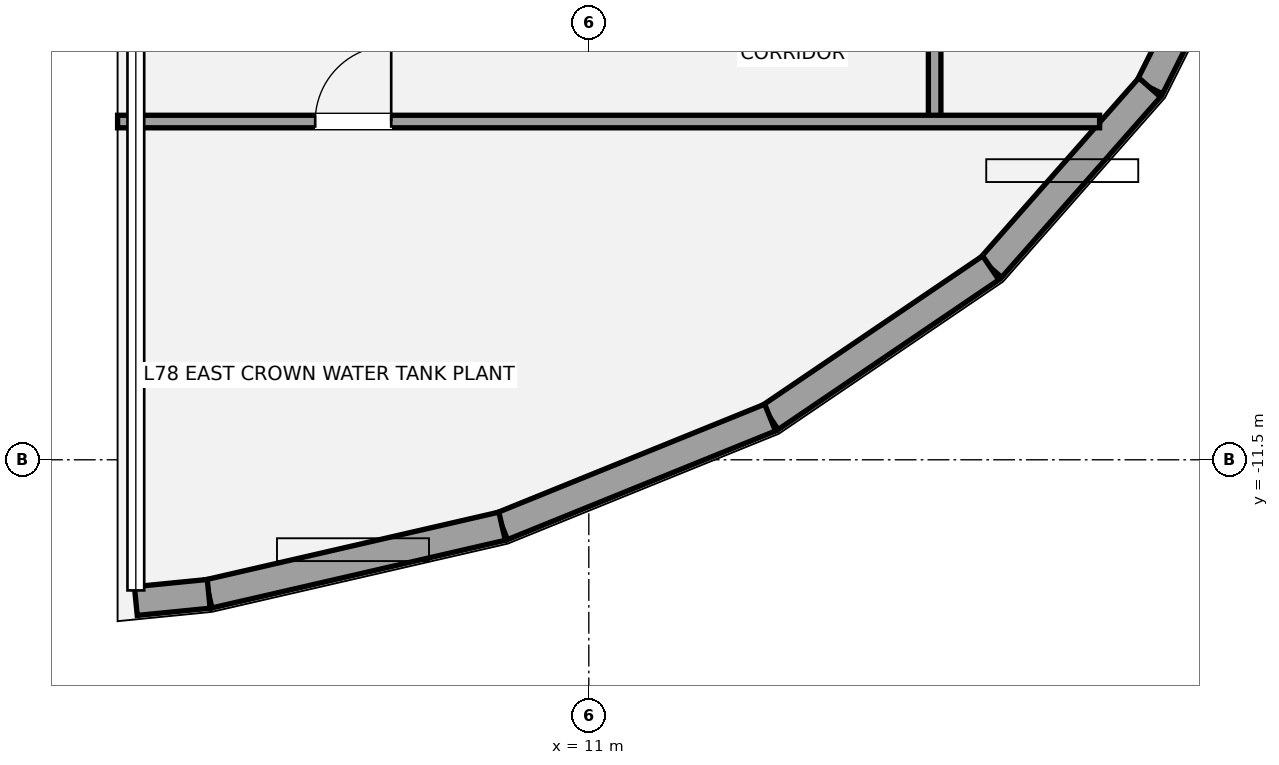
"""IFC4 building model, lengths in metres.
Left out: names, types, materials, properties, quantities, classifications, styles, units other than length and angle.
Written with IfcOpenShell. Run it as: python <this file> out.ifc"""

import sys

from ifc_helpers import new_model, si_unit, direction, frame, frame_2d, origin, place, context, subcontext, project, spatial, rectangle, extrude, element, fill, save


model = new_model("IFC4")
c1 = context("Model", 3, precision=1e-05, world=origin(), true_north=direction((0.0, 1.0)))
c2 = subcontext(c1, "Body", "Model", "MODEL_VIEW")
j1 = project(units=[si_unit("LENGTHUNIT", "METRE"), si_unit("PLANEANGLEUNIT", "RADIAN")], contexts=[c1])
p1 = place(None, origin())
s1 = spatial("IfcSite", under=j1, at=p1, CompositionType="ELEMENT")
p2 = place(p1, origin())
s2 = spatial("IfcBuilding", under=s1, at=p2, CompositionType="ELEMENT")
p3 = place(p2, frame((0.0, 0.0, 276.8)))
s3 = spatial("IfcBuildingStorey", under=s2, at=p3, CompositionType="ELEMENT", Elevation=276.8)
p4 = place(p3, frame((18.379, -6.602, 0.0), z_axis=(0.0, 0.0, 1.0), x_axis=(0.447922433418, 0.894072420803, 0.0)))
e1 = element("IfcWall", 1, at=p4, inside=s3, PredefinedType="ELEMENTEDWALL", context=c2, shape_type="SweptSolid", body=[
    extrude(rectangle(XDim=2.893, YDim=0.38, at=frame_2d((1.446, 0.0))), origin(), (0.0, 0.0, 1.0), 2.97),
])
p5 = place(p3, frame((16.289, -8.975, 0.0), z_axis=(0.0, 0.0, 1.0), x_axis=(0.660965358004, 0.750416414745, 0.0)))
e2 = element("IfcWall", 2, at=p5, inside=s3, PredefinedType="ELEMENTEDWALL", context=c2, shape_type="SweptSolid", body=[
    extrude(rectangle(XDim=3.163, YDim=0.38, at=frame_2d((1.582, 0.0))), origin(), (0.0, 0.0, 1.0), 2.97),
])
p6 = place(p3, frame((13.385, -10.945, 0.0), z_axis=(0.0, 0.0, 1.0), x_axis=(0.827558908117, 0.561378885955, 0.0)))
e3 = element("IfcWall", 3, at=p6, inside=s3, PredefinedType="ELEMENTEDWALL", context=c2, shape_type="SweptSolid", body=[
    extrude(rectangle(XDim=3.508, YDim=0.38, at=frame_2d((1.754, 0.0))), origin(), (0.0, 0.0, 1.0), 2.97),
])
p7 = place(p3, frame((9.859, -12.374, 0.0), z_axis=(0.0, 0.0, 1.0), x_axis=(0.926776699004, 0.375612766268, 0.0)))
e4 = element("IfcWall", 4, at=p7, inside=s3, PredefinedType="ELEMENTEDWALL", context=c2, shape_type="SweptSolid", body=[
    extrude(rectangle(XDim=3.805, YDim=0.38, at=frame_2d((1.902, 0.0))), origin(), (0.0, 0.0, 1.0), 2.97),
])
p8 = place(p3, frame((5.999, -13.264, 0.0), z_axis=(0.0, 0.0, 1.0), x_axis=(0.974441030185, 0.224643447918, 0.0)))
e5 = element("IfcWall", 5, at=p8, inside=s3, PredefinedType="ELEMENTEDWALL", context=c2, shape_type="SweptSolid", body=[
    extrude(rectangle(XDim=3.961, YDim=0.38, at=frame_2d((1.981, 0.0))), origin(), (0.0, 0.0, 1.0), 2.97),
])
p9 = place(p3, frame((5.04, -13.359, 0.0), z_axis=(0.0, 0.0, 1.0), x_axis=(0.995154416473, 0.098324398674, 0.0)))
e6 = element("IfcWall", 6, at=p9, inside=s3, PredefinedType="ELEMENTEDWALL", context=c2, shape_type="SweptSolid", body=[
    extrude(rectangle(XDim=0.963, YDim=0.38, at=frame_2d((0.482, 0.0))), origin(), (0.0, 0.0, 1.0), 2.97),
])
p10 = place(p3, frame((15.55, -7.05, 0.0), z_axis=(0.0, 0.0, 1.0), x_axis=(0.0, 1.0, 0.0)))
e7 = element("IfcWall", 7, at=p10, inside=s3, PredefinedType="PARTITIONING", context=c2, shape_type="SweptSolid", body=[
    extrude(rectangle(XDim=14.7, YDim=0.165, at=frame_2d((7.35, 0.0))), origin(), (0.0, 0.0, 1.0), 2.987),
])
p11 = place(p10, frame((1.8, 0.0, 0.0)))
e8 = element("IfcOpeningElement", 8, at=p11, cuts=e7, PredefinedType="OPENING", context=c2, shape_type="SweptSolid", body=[
    extrude(rectangle(XDim=1.0, YDim=2.15, at=frame_2d((0.5, 1.075))), frame((0.0, 0.093, 0.0), z_axis=(0.0, -1.0, 0.0), x_axis=(1.0, 0.0, 0.0)), (0.0, 0.0, 1.0), 0.185),
])
p12 = place(p10, frame((7.28, 0.0, 0.0)))
e9 = element("IfcOpeningElement", 9, at=p12, cuts=e7, PredefinedType="OPENING", context=c2, shape_type="SweptSolid", body=[
    extrude(rectangle(XDim=1.0, YDim=2.15, at=frame_2d((0.5, 1.075))), frame((0.0, 0.093, 0.0), z_axis=(0.0, -1.0, 0.0), x_axis=(1.0, 0.0, 0.0)), (0.0, 0.0, 1.0), 0.185),
])
p13 = place(p10, frame((11.6, 0.0, 0.0)))
e10 = element("IfcOpeningElement", 10, at=p13, cuts=e7, PredefinedType="OPENING", context=c2, shape_type="SweptSolid", body=[
    extrude(rectangle(XDim=1.0, YDim=2.15, at=frame_2d((0.5, 1.075))), frame((0.0, 0.093, 0.0), z_axis=(0.0, -1.0, 0.0), x_axis=(1.0, 0.0, 0.0)), (0.0, 0.0, 1.0), 0.185),
])
p14 = place(p3, frame((4.8, -7.05, 0.0), z_axis=(0.0, 0.0, 1.0), x_axis=(1.0, 0.0, 0.0)))
e11 = element("IfcWall", 11, at=p14, inside=s3, PredefinedType="PARTITIONING", context=c2, shape_type="SweptSolid", body=[
    extrude(rectangle(XDim=12.92, YDim=0.165, at=frame_2d((6.46, 0.0))), origin(), (0.0, 0.0, 1.0), 2.968),
])
p15 = place(p14, frame((2.6, 0.0, 0.0)))
e12 = element("IfcOpeningElement", 12, at=p15, cuts=e11, PredefinedType="OPENING", context=c2, shape_type="SweptSolid", body=[
    extrude(rectangle(XDim=1.0, YDim=2.15, at=frame_2d((0.5, 1.075))), frame((0.0, 0.093, 0.0), z_axis=(0.0, -1.0, 0.0), x_axis=(1.0, 0.0, 0.0)), (0.0, 0.0, 1.0), 0.185),
])
p16 = place(p15, origin())
e13 = element("IfcDoor", 13, at=p16, inside=s3, OperationType="SINGLE_SWING_RIGHT", PredefinedType="DOOR", context=c2, shape_type="SweptSolid", body=[
    extrude(rectangle(XDim=1.0, YDim=2.15, at=frame_2d((0.5, 1.075))), frame((0.0, 0.025, 0.0), z_axis=(0.0, -1.0, 0.0), x_axis=(1.0, 0.0, 0.0)), (0.0, 0.0, 1.0), 0.05),
])
fill(e12, e13)
save(model, sys.argv[1])
